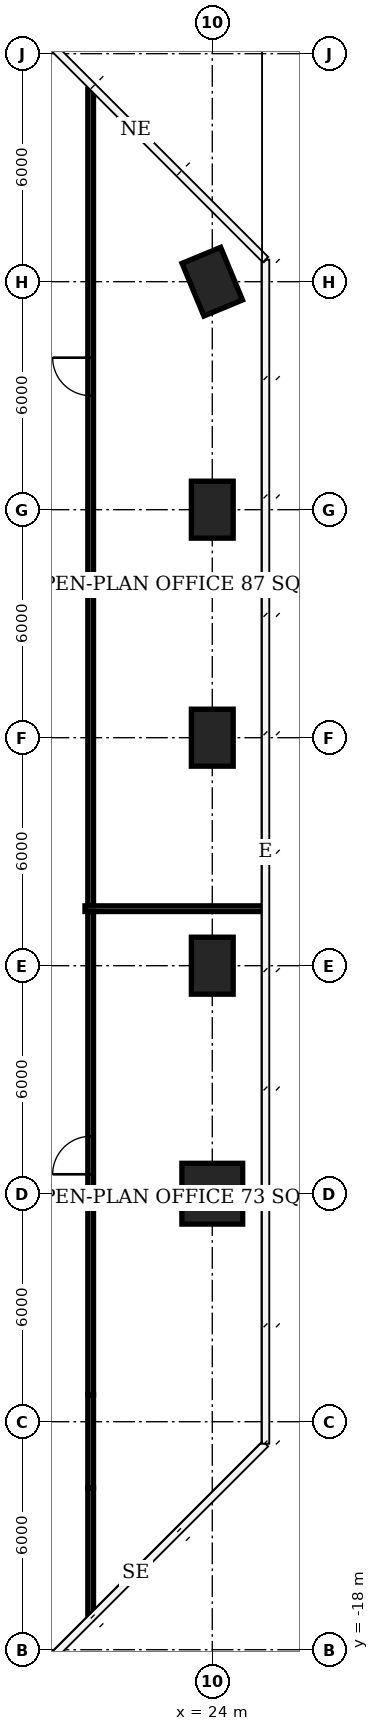
"""IFC4 building model, lengths in metres.
Left out: names, types, materials, properties, quantities, classifications, styles, units other than length and angle.
Written with IfcOpenShell. Run it as: python <this file> out.ifc"""

import sys

from ifc_helpers import new_model, si_unit, direction, frame, frame_2d, origin, origin_2d, place, context, subcontext, project, spatial, rectangle, extrude, element, fill, save


model = new_model("IFC4")
c1 = context("Model", 3, precision=1e-05, world=origin(), true_north=direction((0.0, 1.0)))
c2 = subcontext(c1, "Body", "Model", "MODEL_VIEW")
j1 = project(units=[si_unit("LENGTHUNIT", "METRE"), si_unit("PLANEANGLEUNIT", "RADIAN")], contexts=[c1])
p1 = place(None, origin())
s1 = spatial("IfcSite", under=j1, at=p1, CompositionType="ELEMENT")
p2 = place(p1, origin())
s2 = spatial("IfcBuilding", under=s1, at=p2, CompositionType="ELEMENT")
p3 = place(p2, frame((0.0, 0.0, 212.3)))
s3 = spatial("IfcBuildingStorey", under=s2, at=p3, CompositionType="ELEMENT", Elevation=212.3)
p4 = place(p3, frame((24.0, -6.0, 0.0), z_axis=(0.0, 0.0, 1.0), x_axis=(1.0, 0.0, 0.0)))
e1 = element("IfcColumn", 1, at=p4, inside=s3, PredefinedType="COLUMN", context=c2, shape_type="SweptSolid", body=[
    extrude(rectangle(XDim=1.6, YDim=1.6, at=origin_2d()), origin(), (0.0, 0.0, 1.0), 3.9),
])
for number, where, z_axis, x_axis in (
    (2, (24.0, 0.0, 0.0), (0.0, 0.0, 1.0), (0.0, 1.0, 0.0)),
    (3, (24.0, 6.0, 0.0), (0.0, 0.0, 1.0), (0.0, 1.0, 0.0)),
    (4, (24.0, 12.0, 0.0), (0.0, 0.0, 1.0), (0.0, 1.0, 0.0)),
    (5, (24.0, 18.0, 0.0), (0.0, 0.0, 1.0), (0.383, -0.924, 0.0)),
):
    element("IfcColumn", number, at=place(p3, frame(where, z_axis=z_axis, x_axis=x_axis)), inside=s3, PredefinedType="COLUMN", context=c2, shape_type="SweptSolid", body=[
        extrude(rectangle(XDim=1.5, YDim=1.1, at=origin_2d()), origin(), (0.0, 0.0, 1.0), 3.9),
    ])
p5 = place(p3, frame((20.8, -17.064, 0.0), z_axis=(0.0, 0.0, 1.0), x_axis=(0.0, 1.0, 0.0)))
e6 = element("IfcWall", 6, at=p5, inside=s3, PredefinedType="PARTITIONING", context=c2, shape_type="SweptSolid", body=[
    extrude(rectangle(XDim=3.324, YDim=0.15, at=frame_2d((1.662, 0.0))), origin(), (0.0, 0.0, 1.0), 3.65),
])
p6 = place(p3, frame((20.8, -13.74, 0.0), z_axis=(0.0, 0.0, 1.0), x_axis=(0.0, 1.0, 0.0)))
e7 = element("IfcWall", 7, at=p6, inside=s3, PredefinedType="PARTITIONING", context=c2, shape_type="SweptSolid", body=[
    extrude(rectangle(XDim=2.45, YDim=0.15, at=frame_2d((1.225, 0.0))), origin(), (0.0, 0.0, 1.0), 2.65),
])
p7 = place(p3, frame((20.8, -11.29, 0.0), z_axis=(0.0, 0.0, 1.0), x_axis=(0.0, 1.0, 0.0)))
e8 = element("IfcWall", 8, at=p7, inside=s3, PredefinedType="PARTITIONING", context=c2, shape_type="SweptSolid", body=[
    extrude(rectangle(XDim=12.715, YDim=0.15, at=frame_2d((6.357, 0.0))), origin(), (0.0, 0.0, 1.0), 3.65),
])
p8 = place(p7, frame((5.801, 0.0, 0.0)))
e9 = element("IfcOpeningElement", 9, at=p8, cuts=e8, PredefinedType="OPENING", context=c2, shape_type="SweptSolid", body=[
    extrude(rectangle(XDim=1.0, YDim=2.1, at=frame_2d((0.5, 1.05))), frame((0.0, 0.085, 0.0), z_axis=(0.0, -1.0, 0.0), x_axis=(1.0, 0.0, 0.0)), (0.0, 0.0, 1.0), 0.17),
])
p9 = place(p3, frame((20.8, 1.575, 0.0), z_axis=(0.0, 0.0, 1.0), x_axis=(0.0, 1.0, 0.0)))
e10 = element("IfcWall", 10, at=p9, inside=s3, PredefinedType="PARTITIONING", context=c2, shape_type="SweptSolid", body=[
    extrude(rectangle(XDim=21.489, YDim=0.15, at=frame_2d((10.745, 0.0))), origin(), (0.0, 0.0, 1.0), 3.65),
])
p10 = place(p9, frame((13.425, 0.0, 0.0)))
e11 = element("IfcOpeningElement", 11, at=p10, cuts=e10, PredefinedType="OPENING", context=c2, shape_type="SweptSolid", body=[
    extrude(rectangle(XDim=1.0, YDim=2.1, at=frame_2d((0.5, 1.05))), frame((0.0, 0.085, 0.0), z_axis=(0.0, -1.0, 0.0), x_axis=(1.0, 0.0, 0.0)), (0.0, 0.0, 1.0), 0.17),
])
p11 = place(p3, frame((20.65, 1.5, 0.0), z_axis=(0.0, 0.0, 1.0), x_axis=(1.0, 0.0, 0.0)))
e12 = element("IfcWall", 12, at=p11, inside=s3, PredefinedType="PARTITIONING", context=c2, shape_type="SweptSolid", body=[
    extrude(rectangle(XDim=4.75, YDim=0.15, at=frame_2d((2.375, 0.0))), origin(), (0.0, 0.0, 1.0), 3.65),
])
p12 = place(p8, origin())
e13 = element("IfcDoor", 13, at=p12, inside=s3, OperationType="SINGLE_SWING_LEFT", PredefinedType="DOOR", context=c2, shape_type="SweptSolid", body=[
    extrude(rectangle(XDim=1.0, YDim=2.1, at=frame_2d((0.5, 1.05))), frame((0.0, 0.025, 0.0), z_axis=(0.0, -1.0, 0.0), x_axis=(1.0, 0.0, 0.0)), (0.0, 0.0, 1.0), 0.05),
])
fill(e9, e13)
p13 = place(p10, origin())
e14 = element("IfcDoor", 14, at=p13, inside=s3, OperationType="SINGLE_SWING_RIGHT", PredefinedType="DOOR", context=c2, shape_type="SweptSolid", body=[
    extrude(rectangle(XDim=1.0, YDim=2.1, at=frame_2d((0.5, 1.05))), frame((0.0, 0.025, 0.0), z_axis=(0.0, -1.0, 0.0), x_axis=(1.0, 0.0, 0.0)), (0.0, 0.0, 1.0), 0.05),
])
fill(e11, e14)
save(model, sys.argv[1])
